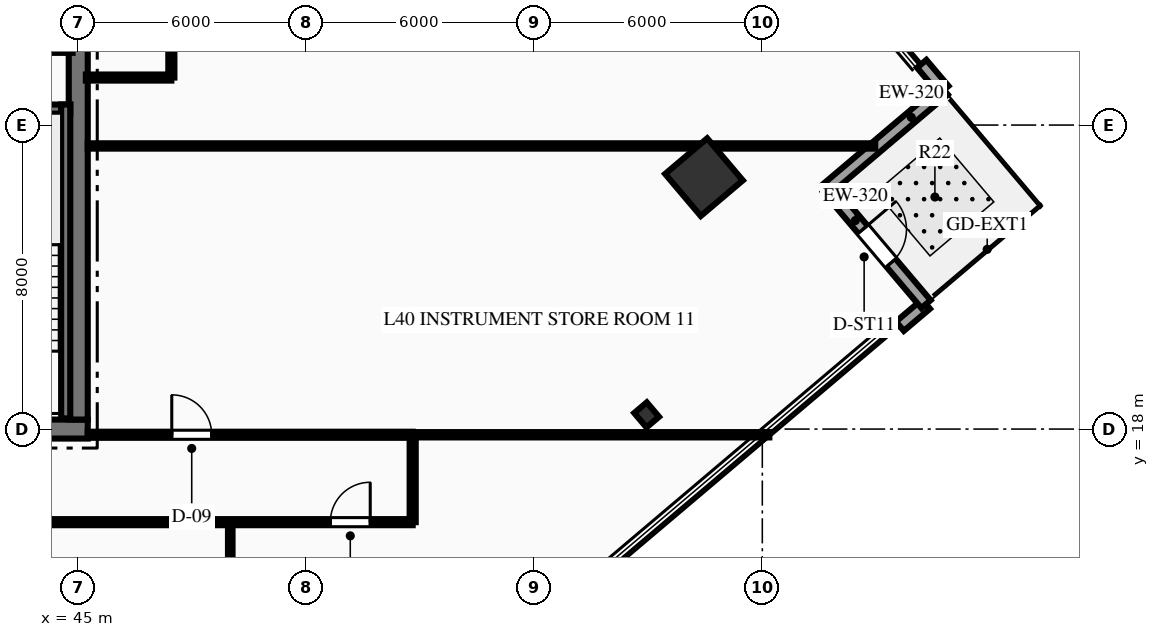
"""IFC4 building model, lengths in metres.
Left out: names, types, materials, properties, quantities, classifications, styles, units other than length and angle.
Written with IfcOpenShell. Run it as: python <this file> out.ifc"""

import sys

from ifc_helpers import new_model, si_unit, direction, frame, frame_2d, origin, origin_2d, place, context, subcontext, project, spatial, rectangle, hollow_rectangle, i_section, extrude, element, fill, save


model = new_model("IFC4")
c1 = context("Model", 3, precision=1e-05, world=origin(), true_north=direction((0.0, 1.0)))
c2 = subcontext(c1, "Body", "Model", "MODEL_VIEW")
j1 = project(units=[si_unit("LENGTHUNIT", "METRE"), si_unit("PLANEANGLEUNIT", "RADIAN")], contexts=[c1])
p1 = place(None, origin())
s1 = spatial("IfcSite", under=j1, at=p1, CompositionType="ELEMENT")
p2 = place(p1, origin())
s2 = spatial("IfcBuilding", under=s1, at=p2, CompositionType="ELEMENT")
p3 = place(p2, frame((0.0, 0.0, 163.2)))
s3 = spatial("IfcBuildingStorey", under=s2, at=p3, CompositionType="ELEMENT", Elevation=163.2)
p4 = place(p3, frame((26.75, 18.0, 0.0), z_axis=(0.0, 0.0, 1.0), x_axis=(1.0, 0.0, 0.0)))
e1 = element("IfcWall", 1, at=p4, inside=s3, PredefinedType="SHEAR", context=c2, shape_type="SweptSolid", body=[
    extrude(rectangle(XDim=18.5, YDim=0.5, at=frame_2d((9.25, 0.0))), origin(), (0.0, 0.0, 1.0), 3.75),
])
p5 = place(p4, frame((7.35, 0.0, 0.0)))
e2 = element("IfcOpeningElement", 2, at=p5, cuts=e1, PredefinedType="OPENING", context=c2, shape_type="SweptSolid", body=[
    extrude(rectangle(XDim=1.1, YDim=2.15, at=frame_2d((0.55, 1.075))), frame((0.0, 0.26, 0.0), z_axis=(0.0, -1.0, 0.0), x_axis=(1.0, 0.0, 0.0)), (0.0, 0.0, 1.0), 0.52),
])
p6 = place(p4, frame((10.05, 0.0, 0.0)))
e3 = element("IfcOpeningElement", 3, at=p6, cuts=e1, PredefinedType="OPENING", context=c2, shape_type="SweptSolid", body=[
    extrude(rectangle(XDim=1.1, YDim=2.15, at=frame_2d((0.55, 1.075))), frame((0.0, 0.26, 0.0), z_axis=(0.0, -1.0, 0.0), x_axis=(1.0, 0.0, 0.0)), (0.0, 0.0, 1.0), 0.52),
])
p7 = place(p3, frame((45.0, 18.25, 0.0), z_axis=(0.0, 0.0, 1.0), x_axis=(0.0, 1.0, 0.0)))
e4 = element("IfcWall", 4, at=p7, inside=s3, PredefinedType="SHEAR", context=c2, shape_type="SweptSolid", body=[
    extrude(rectangle(XDim=15.5, YDim=0.5, at=frame_2d((7.75, 0.0))), origin(), (0.0, 0.0, 1.0), 3.75),
])
p8 = place(p7, frame((9.99, 0.0, 0.0)))
e5 = element("IfcOpeningElement", 5, at=p8, cuts=e4, PredefinedType="OPENING", context=c2, shape_type="SweptSolid", body=[
    extrude(rectangle(XDim=1.4, YDim=2.2, at=frame_2d((0.7, 1.1))), frame((0.0, 0.26, 0.0), z_axis=(0.0, -1.0, 0.0), x_axis=(1.0, 0.0, 0.0)), (0.0, 0.0, 1.0), 0.52),
])
p9 = place(p3, frame((40.81, 26.42, 0.0), z_axis=(0.0, 0.0, 1.0), x_axis=(1.0, 0.0, 0.0)))
e6 = element("IfcWall", 6, at=p9, inside=s3, PredefinedType="SHEAR", context=c2, shape_type="SweptSolid", body=[
    extrude(rectangle(XDim=3.98, YDim=0.24, at=frame_2d((1.99, 0.0))), origin(), (0.0, 0.0, 1.0), 3.75),
])
p10 = place(p3, frame((44.67, 18.28, 0.0), z_axis=(0.0, 0.0, 1.0), x_axis=(0.0, 1.0, 0.0)))
e7 = element("IfcWall", 7, at=p10, inside=s3, PredefinedType="SHEAR", context=c2, shape_type="SweptSolid", body=[
    extrude(rectangle(XDim=8.26, YDim=0.24, at=frame_2d((4.13, 0.0))), origin(), (0.0, 0.0, 1.0), 3.75),
])
p11 = place(p3, frame((61.465, 24.629, 0.0), z_axis=(0.0, 0.0, 1.0), x_axis=(0.763232469783, 0.646123979643, 0.0)))
e8 = element("IfcColumn", 8, at=p11, inside=s3, PredefinedType="COLUMN", context=c2, shape_type="SweptSolid", body=[
    extrude(hollow_rectangle(XDim=1.45, YDim=1.45, WallThickness=0.07, at=origin_2d()), origin(), (0.0, 0.0, 1.0), 3.75),
])
p12 = place(p3, frame((59.956, 18.373, 0.0), z_axis=(0.0, 0.0, 1.0), x_axis=(0.763232469783, 0.646123979643, 0.0)))
e9 = element("IfcColumn", 9, at=p12, inside=s3, PredefinedType="COLUMN", context=c2, shape_type="SweptSolid", body=[
    extrude(i_section(OverallWidth=0.432, OverallDepth=0.498, WebThickness=0.056, FlangeThickness=0.089, at=origin_2d()), origin(), (0.0, 0.0, 1.0), 3.75),
])
p13 = place(p3, frame((67.307, 21.288, 0.0), z_axis=(0.0, 0.0, 1.0), x_axis=(-0.763396575401, -0.645930080323, 0.0)))
e10 = element("IfcWall", 10, at=p13, inside=s3, PredefinedType="STANDARD", context=c2, shape_type="SweptSolid", body=[
    extrude(rectangle(XDim=0.9, YDim=0.32, at=frame_2d((0.45, 0.0))), origin(), (0.0, 0.0, 1.0), 3.46),
])
p14 = place(p3, frame((64.723, 24.341, 0.0), z_axis=(0.0, 0.0, 1.0), x_axis=(0.646114595748, -0.763240413737, 0.0)))
e11 = element("IfcWall", 11, at=p14, inside=s3, PredefinedType="STANDARD", context=c2, shape_type="SweptSolid", body=[
    extrude(rectangle(XDim=4.0, YDim=0.32, at=frame_2d((2.0, 0.0))), origin(), (0.0, 0.0, 1.0), 3.46),
])
p15 = place(p14, frame((1.425, 0.0, 0.0)))
e12 = element("IfcOpeningElement", 12, at=p15, cuts=e11, PredefinedType="OPENING", context=c2, shape_type="SweptSolid", body=[
    extrude(rectangle(XDim=1.15, YDim=2.2, at=frame_2d((0.575, 1.1))), frame((0.0, 0.17, 0.0), z_axis=(0.0, -1.0, 0.0), x_axis=(1.0, 0.0, 0.0)), (0.0, 0.0, 1.0), 0.34),
])
p16 = place(p3, frame((67.776, 26.925, 0.0), z_axis=(0.0, 0.0, 1.0), x_axis=(-0.763214932113, -0.646144695405, 0.0)))
e13 = element("IfcWall", 13, at=p16, inside=s3, PredefinedType="STANDARD", context=c2, shape_type="SweptSolid", body=[
    extrude(rectangle(XDim=4.0, YDim=0.32, at=frame_2d((2.0, 0.0))), origin(), (0.0, 0.0, 1.0), 3.46),
])
p17 = place(p3, frame((67.194, 27.612, 0.0), z_axis=(0.0, 0.0, 1.0), x_axis=(0.64608813683, -0.763262811519, 0.0)))
e14 = element("IfcWall", 14, at=p17, inside=s3, PredefinedType="STANDARD", context=c2, shape_type="SweptSolid", body=[
    extrude(rectangle(XDim=0.9, YDim=0.32, at=frame_2d((0.45, 0.0))), origin(), (0.0, 0.0, 1.0), 3.46),
])
p18 = place(p3, frame((40.8, 27.98, 0.0), z_axis=(0.0, 0.0, 1.0), x_axis=(1.0, 0.0, 0.0)))
e15 = element("IfcWall", 15, at=p18, inside=s3, PredefinedType="PARTITIONING", context=c2, shape_type="SweptSolid", body=[
    extrude(rectangle(XDim=4.05, YDim=0.16, at=frame_2d((2.025, 0.0))), origin(), (0.0, 0.0, 1.0), 3.46),
])
p19 = place(p18, frame((1.475, 0.0, 0.0)))
e16 = element("IfcOpeningElement", 16, at=p19, cuts=e15, PredefinedType="OPENING", context=c2, shape_type="SweptSolid", body=[
    extrude(rectangle(XDim=0.95, YDim=2.15, at=frame_2d((0.475, 1.075))), frame((0.0, 0.09, 0.0), z_axis=(0.0, -1.0, 0.0), x_axis=(1.0, 0.0, 0.0)), (0.0, 0.0, 1.0), 0.18),
])
p20 = place(p3, frame((18.2, 15.55, 0.0), z_axis=(0.0, 0.0, 1.0), x_axis=(1.0, 0.0, 0.0)))
e17 = element("IfcWall", 17, at=p20, inside=s3, PredefinedType="PARTITIONING", context=c2, shape_type="SweptSolid", body=[
    extrude(rectangle(XDim=35.6, YDim=0.16, at=frame_2d((17.8, 0.0))), origin(), (0.0, 0.0, 1.0), 3.46),
])
p21 = place(p20, frame((5.345, 0.0, 0.0)))
e18 = element("IfcOpeningElement", 18, at=p21, cuts=e17, PredefinedType="OPENING", context=c2, shape_type="SweptSolid", body=[
    extrude(rectangle(XDim=1.05, YDim=2.15, at=frame_2d((0.525, 1.075))), frame((0.0, 0.09, 0.0), z_axis=(0.0, -1.0, 0.0), x_axis=(1.0, 0.0, 0.0)), (0.0, 0.0, 1.0), 0.18),
])
p22 = place(p20, frame((15.275, 0.0, 0.0)))
e19 = element("IfcOpeningElement", 19, at=p22, cuts=e17, PredefinedType="OPENING", context=c2, shape_type="SweptSolid", body=[
    extrude(rectangle(XDim=1.05, YDim=2.15, at=frame_2d((0.525, 1.075))), frame((0.0, 0.09, 0.0), z_axis=(0.0, -1.0, 0.0), x_axis=(1.0, 0.0, 0.0)), (0.0, 0.0, 1.0), 0.18),
])
p23 = place(p20, frame((25.055, 0.0, 0.0)))
e20 = element("IfcOpeningElement", 20, at=p23, cuts=e17, PredefinedType="OPENING", context=c2, shape_type="SweptSolid", body=[
    extrude(rectangle(XDim=1.05, YDim=2.15, at=frame_2d((0.525, 1.075))), frame((0.0, 0.09, 0.0), z_axis=(0.0, -1.0, 0.0), x_axis=(1.0, 0.0, 0.0)), (0.0, 0.0, 1.0), 0.18),
])
p24 = place(p20, frame((33.433, 0.0, 0.0)))
e21 = element("IfcOpeningElement", 21, at=p24, cuts=e17, PredefinedType="OPENING", context=c2, shape_type="SweptSolid", body=[
    extrude(rectangle(XDim=1.05, YDim=2.15, at=frame_2d((0.525, 1.075))), frame((0.0, 0.09, 0.0), z_axis=(0.0, -1.0, 0.0), x_axis=(1.0, 0.0, 0.0)), (0.0, 0.0, 1.0), 0.18),
])
p25 = place(p3, frame((45.25, 17.85, 0.0), z_axis=(0.0, 0.0, 1.0), x_axis=(1.0, 0.0, 0.0)))
e22 = element("IfcWall", 22, at=p25, inside=s3, PredefinedType="PARTITIONING", context=c2, shape_type="SweptSolid", body=[
    extrude(rectangle(XDim=8.55, YDim=0.16, at=frame_2d((4.275, 0.0))), origin(), (0.0, 0.0, 1.0), 2.839),
])
p26 = place(p25, frame((2.211, 0.0, 0.0)))
e23 = element("IfcOpeningElement", 23, at=p26, cuts=e22, PredefinedType="OPENING", context=c2, shape_type="SweptSolid", body=[
    extrude(rectangle(XDim=1.05, YDim=2.15, at=frame_2d((0.525, 1.075))), frame((0.0, 0.09, 0.0), z_axis=(0.0, -1.0, 0.0), x_axis=(1.0, 0.0, 0.0)), (0.0, 0.0, 1.0), 0.18),
])
p27 = place(p3, frame((47.45, 27.25, 0.0), z_axis=(0.0, 0.0, 1.0), x_axis=(0.0, 1.0, 0.0)))
e24 = element("IfcWall", 24, at=p27, inside=s3, PredefinedType="PARTITIONING", context=c2, shape_type="SweptSolid", body=[
    extrude(rectangle(XDim=6.9, YDim=0.16, at=frame_2d((3.45, 0.0))), origin(), (0.0, 0.0, 1.0), 3.46),
])
p28 = place(p27, frame((1.683, 0.0, 0.0)))
e25 = element("IfcOpeningElement", 25, at=p28, cuts=e24, PredefinedType="OPENING", context=c2, shape_type="SweptSolid", body=[
    extrude(rectangle(XDim=1.05, YDim=2.15, at=frame_2d((0.525, 1.075))), frame((0.0, 0.09, 0.0), z_axis=(0.0, -1.0, 0.0), x_axis=(1.0, 0.0, 0.0)), (0.0, 0.0, 1.0), 0.18),
])
p29 = place(p3, frame((45.2, 27.25, 0.0), z_axis=(0.0, 0.0, 1.0), x_axis=(1.0, 0.0, 0.0)))
e26 = element("IfcWall", 26, at=p29, inside=s3, PredefinedType="PARTITIONING", context=c2, shape_type="SweptSolid", body=[
    extrude(rectangle(XDim=2.25, YDim=0.16, at=frame_2d((1.125, 0.0))), origin(), (0.0, 0.0, 1.0), 3.46),
])
p30 = place(p3, frame((53.8, 15.55, 0.0), z_axis=(0.0, 0.0, 1.0), x_axis=(0.0, 1.0, 0.0)))
e27 = element("IfcWall", 27, at=p30, inside=s3, PredefinedType="PARTITIONING", context=c2, shape_type="SweptSolid", body=[
    extrude(rectangle(XDim=2.3, YDim=0.16, at=frame_2d((1.15, 0.0))), origin(), (0.0, 0.0, 1.0), 3.46),
])
p31 = place(p3, frame((53.8, 17.85, 0.0), z_axis=(0.0, 0.0, 1.0), x_axis=(1.0, 0.0, 0.0)))
e28 = element("IfcWall", 28, at=p31, inside=s3, PredefinedType="PARTITIONING", context=c2, shape_type="SweptSolid", body=[
    extrude(rectangle(XDim=9.385, YDim=0.14, at=frame_2d((4.692, 0.0))), origin(), (0.0, 0.0, 1.0), 2.839),
])
p32 = place(p3, frame((49.0, 5.842, 0.0), z_axis=(0.0, 0.0, 1.0), x_axis=(0.0, 1.0, 0.0)))
e29 = element("IfcWall", 29, at=p32, inside=s3, PredefinedType="PARTITIONING", context=c2, shape_type="SweptSolid", body=[
    extrude(rectangle(XDim=9.708, YDim=0.12, at=frame_2d((4.854, 0.0))), origin(), (0.0, 0.0, 1.0), 3.46),
])
p33 = place(p3, frame((45.25, 25.45, 0.0), z_axis=(0.0, 0.0, 1.0), x_axis=(1.0, 0.0, 0.0)))
e30 = element("IfcWall", 30, at=p33, inside=s3, PredefinedType="PARTITIONING", context=c2, shape_type="SweptSolid", body=[
    extrude(rectangle(XDim=20.721, YDim=0.14, at=frame_2d((10.361, 0.0))), origin(), (0.0, 0.0, 1.0), 3.46),
])
p34 = place(p15, origin())
e31 = element("IfcDoor", 31, at=p34, inside=s3, OperationType="SINGLE_SWING_LEFT", PredefinedType="DOOR", context=c2, shape_type="SweptSolid", body=[
    extrude(rectangle(XDim=1.15, YDim=2.2, at=frame_2d((0.575, 1.1))), frame((0.0, 0.025, 0.0), z_axis=(0.0, -1.0, 0.0), x_axis=(1.0, 0.0, 0.0)), (0.0, 0.0, 1.0), 0.05),
])
fill(e12, e31)
p35 = place(p24, origin())
e32 = element("IfcDoor", 32, at=p35, inside=s3, OperationType="SINGLE_SWING_RIGHT", PredefinedType="DOOR", context=c2, shape_type="SweptSolid", body=[
    extrude(rectangle(XDim=1.05, YDim=2.15, at=frame_2d((0.525, 1.075))), frame((0.0, 0.025, 0.0), z_axis=(0.0, -1.0, 0.0), x_axis=(1.0, 0.0, 0.0)), (0.0, 0.0, 1.0), 0.05),
])
fill(e21, e32)
p36 = place(p26, origin())
e33 = element("IfcDoor", 33, at=p36, inside=s3, OperationType="SINGLE_SWING_LEFT", PredefinedType="DOOR", context=c2, shape_type="SweptSolid", body=[
    extrude(rectangle(XDim=1.05, YDim=2.15, at=frame_2d((0.525, 1.075))), frame((0.0, 0.025, 0.0), z_axis=(0.0, -1.0, 0.0), x_axis=(1.0, 0.0, 0.0)), (0.0, 0.0, 1.0), 0.05),
])
fill(e23, e33)
save(model, sys.argv[1])
